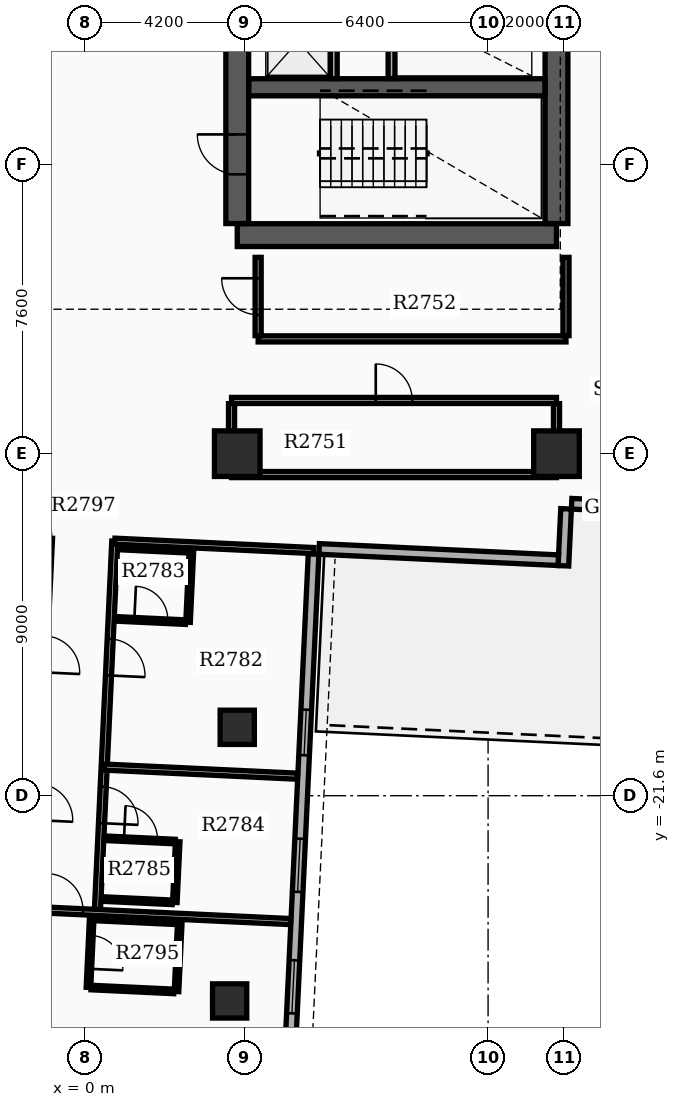
"""IFC4 building model, lengths in metres.
Left out: names, types, materials, properties, quantities, classifications, styles, units other than length and angle.
Written with IfcOpenShell. Run it as: python <this file> out.ifc"""

import sys

from ifc_helpers import new_model, si_unit, direction, frame, frame_2d, origin, origin_2d, place, context, subcontext, project, spatial, rectangle, extrude, element, fill, save


model = new_model("IFC4")
c1 = context("Model", 3, precision=1e-05, world=origin(), true_north=direction((0.0, 1.0)))
c2 = subcontext(c1, "Body", "Model", "MODEL_VIEW")
j1 = project(units=[si_unit("LENGTHUNIT", "METRE"), si_unit("PLANEANGLEUNIT", "RADIAN")], contexts=[c1])
p1 = place(None, origin())
s1 = spatial("IfcSite", under=j1, at=p1, CompositionType="ELEMENT")
p2 = place(p1, origin())
s2 = spatial("IfcBuilding", under=s1, at=p2, CompositionType="ELEMENT")
p3 = place(p2, frame((0.0, 0.0, 172.2)))
s3 = spatial("IfcBuildingStorey", under=s2, at=p3, CompositionType="ELEMENT", Elevation=172.2)
p4 = place(p3, frame((4.0, -6.85, 0.0), z_axis=(0.0, 0.0, 1.0), x_axis=(1.0, 0.0, 0.0)))
e1 = element("IfcWall", 1, at=p4, inside=s3, PredefinedType="SHEAR", context=c2, shape_type="SweptSolid", body=[
    extrude(rectangle(XDim=8.4, YDim=0.6, at=frame_2d((4.2, 0.0))), origin(), (0.0, 0.0, 1.0), 3.7),
])
p5 = place(p3, frame((4.0, -6.545, 0.0), z_axis=(0.0, 0.0, 1.0), x_axis=(0.0, 1.0, 0.0)))
e2 = element("IfcWall", 2, at=p5, inside=s3, PredefinedType="SHEAR", context=c2, shape_type="SweptSolid", body=[
    extrude(rectangle(XDim=11.19, YDim=0.6, at=frame_2d((5.595, 0.0))), origin(), (0.0, 0.0, 1.0), 3.7),
])
p6 = place(p5, frame((1.295, 0.0, 0.0)))
e3 = element("IfcOpeningElement", 3, at=p6, cuts=e2, PredefinedType="OPENING", context=c2, shape_type="SweptSolid", body=[
    extrude(rectangle(XDim=1.05, YDim=2.15, at=frame_2d((0.525, 1.075))), frame((0.0, 0.31, 0.0), z_axis=(0.0, -1.0, 0.0), x_axis=(1.0, 0.0, 0.0)), (0.0, 0.0, 1.0), 0.62),
])
p7 = place(p5, frame((6.895, 0.0, 0.0)))
e4 = element("IfcOpeningElement", 4, at=p7, cuts=e2, PredefinedType="OPENING", context=c2, shape_type="SweptSolid", body=[
    extrude(rectangle(XDim=1.05, YDim=2.15, at=frame_2d((0.525, 1.075))), frame((0.0, 0.31, 0.0), z_axis=(0.0, -1.0, 0.0), x_axis=(1.0, 0.0, 0.0)), (0.0, 0.0, 1.0), 0.62),
])
p8 = place(p3, frame((12.4, -6.545, 0.0), z_axis=(0.0, 0.0, 1.0), x_axis=(0.0, 1.0, 0.0)))
e5 = element("IfcWall", 5, at=p8, inside=s3, PredefinedType="SHEAR", context=c2, shape_type="SweptSolid", body=[
    extrude(rectangle(XDim=11.19, YDim=0.6, at=frame_2d((5.595, 0.0))), origin(), (0.0, 0.0, 1.0), 3.7),
])
p9 = place(p3, frame((4.305, -2.96, 0.0), z_axis=(0.0, 0.0, 1.0), x_axis=(1.0, 0.0, 0.0)))
e6 = element("IfcWall", 6, at=p9, inside=s3, PredefinedType="SHEAR", context=c2, shape_type="SweptSolid", body=[
    extrude(rectangle(XDim=7.79, YDim=0.45, at=frame_2d((3.895, 0.0))), origin(), (0.0, 0.0, 1.0), 3.7),
])
for number, where, z_axis, x_axis in (
    (7, (12.4, -12.6, 0.0), (0.0, 0.0, 1.0), (1.0, 0.0, 0.0)),
    (8, (4.0, -12.6, 0.0), (0.0, 0.0, 1.0), (1.0, 0.0, 0.0)),
):
    element("IfcColumn", number, at=place(p3, frame(where, z_axis=z_axis, x_axis=x_axis)), inside=s3, PredefinedType="COLUMN", context=c2, shape_type="SweptSolid", body=[
        extrude(rectangle(XDim=1.2, YDim=1.2, at=origin_2d()), origin(), (0.0, 0.0, 1.0), 3.9),
    ])
for number, where, z_axis, x_axis in (
    (9, (4.0, -19.8, 0.0), (0.0, 0.0, 1.0), (1.0, 0.0, 0.0)),
    (10, (3.8, -27.0, 0.0), (0.0, 0.0, 1.0), (1.0, 0.0, 0.0)),
):
    element("IfcColumn", number, at=place(p3, frame(where, z_axis=z_axis, x_axis=x_axis)), inside=s3, PredefinedType="COLUMN", context=c2, shape_type="SweptSolid", body=[
        extrude(rectangle(XDim=0.9, YDim=0.9, at=origin_2d()), origin(), (0.0, 0.0, 1.0), 3.9),
    ])
p10 = place(p3, frame((5.062, -35.318, 0.0), z_axis=(0.0, 0.0, 1.0), x_axis=(0.047103473814, 0.998890015344, 0.0)))
e11 = element("IfcWall", 11, at=p10, inside=s3, PredefinedType="STANDARD", context=c2, shape_type="SweptSolid", body=[
    extrude(rectangle(XDim=20.1, YDim=0.28, at=frame_2d((10.05, 0.0))), origin(), (0.0, 0.0, 1.0), 2.97),
])
p11 = place(p10, frame((1.6, 0.0, 0.8)))
e12 = element("IfcOpeningElement", 12, at=p11, cuts=e11, PredefinedType="OPENING", context=c2, shape_type="SweptSolid", body=[
    extrude(rectangle(XDim=1.4, YDim=1.6, at=frame_2d((0.7, 0.8))), frame((0.0, 0.15, 0.0), z_axis=(0.0, -1.0, 0.0), x_axis=(1.0, 0.0, 0.0)), (0.0, 0.0, 1.0), 0.3),
])
p12 = place(p10, frame((4.8, 0.0, 0.8)))
e13 = element("IfcOpeningElement", 13, at=p12, cuts=e11, PredefinedType="OPENING", context=c2, shape_type="SweptSolid", body=[
    extrude(rectangle(XDim=1.4, YDim=1.6, at=frame_2d((0.7, 0.8))), frame((0.0, 0.15, 0.0), z_axis=(0.0, -1.0, 0.0), x_axis=(1.0, 0.0, 0.0)), (0.0, 0.0, 1.0), 0.3),
])
p13 = place(p10, frame((8.0, 0.0, 0.8)))
e14 = element("IfcOpeningElement", 14, at=p13, cuts=e11, PredefinedType="OPENING", context=c2, shape_type="SweptSolid", body=[
    extrude(rectangle(XDim=1.4, YDim=1.6, at=frame_2d((0.7, 0.8))), frame((0.0, 0.15, 0.0), z_axis=(0.0, -1.0, 0.0), x_axis=(1.0, 0.0, 0.0)), (0.0, 0.0, 1.0), 0.3),
])
p14 = place(p10, frame((11.2, 0.0, 0.8)))
e15 = element("IfcOpeningElement", 15, at=p14, cuts=e11, PredefinedType="OPENING", context=c2, shape_type="SweptSolid", body=[
    extrude(rectangle(XDim=1.4, YDim=1.6, at=frame_2d((0.7, 0.8))), frame((0.0, 0.15, 0.0), z_axis=(0.0, -1.0, 0.0), x_axis=(1.0, 0.0, 0.0)), (0.0, 0.0, 1.0), 0.3),
])
p15 = place(p10, frame((14.799, 0.0, 0.85)))
e16 = element("IfcOpeningElement", 16, at=p15, cuts=e11, PredefinedType="OPENING", context=c2, shape_type="SweptSolid", body=[
    extrude(rectangle(XDim=1.2, YDim=1.6, at=frame_2d((0.6, 0.8))), frame((0.0, 0.15, 0.0), z_axis=(0.0, -1.0, 0.0), x_axis=(1.0, 0.0, 0.0)), (0.0, 0.0, 1.0), 0.3),
])
p16 = place(p3, frame((14.017, -13.976, 0.0), z_axis=(0.0, 0.0, 1.0), x_axis=(-0.998883930236, 0.047232339719, 0.0)))
e17 = element("IfcWall", 17, at=p16, inside=s3, PredefinedType="STANDARD", context=c2, shape_type="SweptSolid", body=[
    extrude(rectangle(XDim=1.22, YDim=0.28, at=frame_2d((0.61, 0.0))), origin(), (0.0, 0.0, 1.0), 2.97),
])
p17 = place(p3, frame((12.652, -14.052, 0.0), z_axis=(0.0, 0.0, 1.0), x_axis=(-0.047039284441, -0.99889304018, 0.0)))
e18 = element("IfcWall", 18, at=p17, inside=s3, PredefinedType="STANDARD", context=c2, shape_type="SweptSolid", body=[
    extrude(rectangle(XDim=1.5, YDim=0.28, at=frame_2d((0.75, 0.0))), origin(), (0.0, 0.0, 1.0), 2.97),
])
p18 = place(p3, frame((12.448, -15.404, 0.0), z_axis=(0.0, 0.0, 1.0), x_axis=(-0.998889082162, 0.047123258997, 0.0)))
e19 = element("IfcWall", 19, at=p18, inside=s3, PredefinedType="STANDARD", context=c2, shape_type="SweptSolid", body=[
    extrude(rectangle(XDim=6.3, YDim=0.28, at=frame_2d((3.15, 0.0))), origin(), (0.0, 0.0, 1.0), 2.97),
])
for number, where, z_axis, x_axis in (
    (20, (6.54, -2.73, 0.0), (0.0, 0.0, 1.0), (0.0, 1.0, 0.0)),
    (21, (8.06, -2.73, 0.0), (0.0, 0.0, 1.0), (0.0, 1.0, 0.0)),
):
    element("IfcWall", number, at=place(p3, frame(where, z_axis=z_axis, x_axis=x_axis)), inside=s3, PredefinedType="SOLIDWALL", context=c2, shape_type="SweptSolid", body=[
        extrude(rectangle(XDim=1.89, YDim=0.18, at=frame_2d((0.945, 0.0))), origin(), (0.0, 0.0, 1.0), 2.96),
    ])
p19 = place(p3, frame((3.85, -13.15, 0.0), z_axis=(0.0, 0.0, 1.0), x_axis=(1.0, 0.0, 0.0)))
e22 = element("IfcWall", 22, at=p19, inside=s3, PredefinedType="PARTITIONING", context=c2, shape_type="SweptSolid", body=[
    extrude(rectangle(XDim=8.55, YDim=0.16, at=frame_2d((4.275, 0.0))), origin(), (0.0, 0.0, 1.0), 2.96),
])
p20 = place(p3, frame((3.85, -11.2, 0.0), z_axis=(0.0, 0.0, 1.0), x_axis=(1.0, 0.0, 0.0)))
e23 = element("IfcWall", 23, at=p20, inside=s3, PredefinedType="PARTITIONING", context=c2, shape_type="SweptSolid", body=[
    extrude(rectangle(XDim=8.55, YDim=0.16, at=frame_2d((4.275, 0.0))), origin(), (0.0, 0.0, 1.0), 2.96),
])
p21 = place(p20, frame((3.795, 0.0, 0.0)))
e24 = element("IfcOpeningElement", 24, at=p21, cuts=e23, PredefinedType="OPENING", context=c2, shape_type="SweptSolid", body=[
    extrude(rectangle(XDim=0.96, YDim=2.15, at=frame_2d((0.48, 1.075))), frame((0.0, 0.09, 0.0), z_axis=(0.0, -1.0, 0.0), x_axis=(1.0, 0.0, 0.0)), (0.0, 0.0, 1.0), 0.18),
])
for number, where, z_axis, x_axis in (
    (25, (3.85, -13.065, 0.0), (0.0, 0.0, 1.0), (0.0, 1.0, 0.0)),
    (26, (12.4, -13.065, 0.0), (0.0, 0.0, 1.0), (0.0, 1.0, 0.0)),
):
    element("IfcWall", number, at=place(p3, frame(where, z_axis=z_axis, x_axis=x_axis)), inside=s3, PredefinedType="PARTITIONING", context=c2, shape_type="SweptSolid", body=[
        extrude(rectangle(XDim=1.78, YDim=0.16, at=frame_2d((0.89, 0.0))), origin(), (0.0, 0.0, 1.0), 2.96),
    ])
p22 = place(p3, frame((4.55, -9.58, 0.0), z_axis=(0.0, 0.0, 1.0), x_axis=(1.0, 0.0, 0.0)))
e27 = element("IfcWall", 27, at=p22, inside=s3, PredefinedType="PARTITIONING", context=c2, shape_type="SweptSolid", body=[
    extrude(rectangle(XDim=8.1, YDim=0.16, at=frame_2d((4.05, 0.0))), origin(), (0.0, 0.0, 1.0), 2.96),
])
p23 = place(p3, frame((4.55, -9.495, 0.0), z_axis=(0.0, 0.0, 1.0), x_axis=(0.0, 1.0, 0.0)))
e28 = element("IfcWall", 28, at=p23, inside=s3, PredefinedType="PARTITIONING", context=c2, shape_type="SweptSolid", body=[
    extrude(rectangle(XDim=2.06, YDim=0.16, at=frame_2d((1.03, 0.0))), origin(), (0.0, 0.0, 1.0), 2.96),
])
p24 = place(p23, frame((0.55, 0.0, 0.0)))
e29 = element("IfcOpeningElement", 29, at=p24, cuts=e28, PredefinedType="OPENING", context=c2, shape_type="SweptSolid", body=[
    extrude(rectangle(XDim=0.96, YDim=2.15, at=frame_2d((0.48, 1.075))), frame((0.0, 0.09, 0.0), z_axis=(0.0, -1.0, 0.0), x_axis=(1.0, 0.0, 0.0)), (0.0, 0.0, 1.0), 0.18),
])
p25 = place(p3, frame((12.65, -9.495, 0.0), z_axis=(0.0, 0.0, 1.0), x_axis=(0.0, 1.0, 0.0)))
e30 = element("IfcWall", 30, at=p25, inside=s3, PredefinedType="PARTITIONING", context=c2, shape_type="SweptSolid", body=[
    extrude(rectangle(XDim=2.06, YDim=0.16, at=frame_2d((1.03, 0.0))), origin(), (0.0, 0.0, 1.0), 2.96),
])
p26 = place(p3, frame((0.779, -14.903, 0.0), z_axis=(0.0, 0.0, 1.0), x_axis=(-0.047091598416, -0.998890575268, 0.0)))
e31 = element("IfcWall", 31, at=p26, inside=s3, PredefinedType="PARTITIONING", context=c2, shape_type="SweptSolid", body=[
    extrude(rectangle(XDim=9.7, YDim=0.16, at=frame_2d((4.85, 0.0))), origin(), (0.0, 0.0, 1.0), 2.96),
])
p27 = place(p26, frame((2.575, 0.0, 0.0)))
e32 = element("IfcOpeningElement", 32, at=p27, cuts=e31, PredefinedType="OPENING", context=c2, shape_type="SweptSolid", body=[
    extrude(rectangle(XDim=0.96, YDim=2.15, at=frame_2d((0.48, 1.075))), frame((0.0, 0.09, 0.0), z_axis=(0.0, -1.0, 0.0), x_axis=(1.0, 0.0, 0.0)), (0.0, 0.0, 1.0), 0.18),
])
p28 = place(p26, frame((6.467, 0.0, 0.0)))
e33 = element("IfcOpeningElement", 33, at=p28, cuts=e31, PredefinedType="OPENING", context=c2, shape_type="SweptSolid", body=[
    extrude(rectangle(XDim=0.96, YDim=2.15, at=frame_2d((0.48, 1.075))), frame((0.0, 0.09, 0.0), z_axis=(0.0, -1.0, 0.0), x_axis=(1.0, 0.0, 0.0)), (0.0, 0.0, 1.0), 0.18),
])
p29 = place(p3, frame((0.779, -14.903, 0.0), z_axis=(0.0, 0.0, 1.0), x_axis=(0.998889957338, -0.047104703898, 0.0)))
e34 = element("IfcWall", 34, at=p29, inside=s3, PredefinedType="PARTITIONING", context=c2, shape_type="SweptSolid", body=[
    extrude(rectangle(XDim=5.24, YDim=0.16, at=frame_2d((2.62, 0.0))), origin(), (0.0, 0.0, 1.0), 2.96),
])
p30 = place(p3, frame((0.499, -20.847, 0.0), z_axis=(0.0, 0.0, 1.0), x_axis=(0.998891017342, -0.047082220362, 0.0)))
e35 = element("IfcWall", 35, at=p30, inside=s3, PredefinedType="PARTITIONING", context=c2, shape_type="SweptSolid", body=[
    extrude(rectangle(XDim=5.092, YDim=0.16, at=frame_2d((2.546, 0.0))), origin(), (0.0, 0.0, 1.0), 2.96),
])
p31 = place(p3, frame((0.823, -16.948, 0.0), z_axis=(0.0, 0.0, 1.0), x_axis=(0.998891083954, -0.047080807099, 0.0)))
e36 = element("IfcWall", 36, at=p31, inside=s3, PredefinedType="PARTITIONING", context=c2, shape_type="SweptSolid", body=[
    extrude(rectangle(XDim=1.82, YDim=0.12, at=frame_2d((0.91, 0.0))), origin(), (0.0, 0.0, 1.0), 2.96),
])
p32 = place(p31, frame((0.47, 0.0, 0.0)))
e37 = element("IfcOpeningElement", 37, at=p32, cuts=e36, PredefinedType="OPENING", context=c2, shape_type="SweptSolid", body=[
    extrude(rectangle(XDim=0.88, YDim=2.1, at=frame_2d((0.44, 1.05))), frame((0.0, 0.07, 0.0), z_axis=(0.0, -1.0, 0.0), x_axis=(1.0, 0.0, 0.0)), (0.0, 0.0, 1.0), 0.14),
])
p33 = place(p3, frame((0.911, -15.07, 0.0), z_axis=(0.0, 0.0, 1.0), x_axis=(0.998884467853, -0.047220968666, 0.0)))
e38 = element("IfcWall", 38, at=p33, inside=s3, PredefinedType="PARTITIONING", context=c2, shape_type="SweptSolid", body=[
    extrude(rectangle(XDim=1.82, YDim=0.12, at=frame_2d((0.91, 0.0))), origin(), (0.0, 0.0, 1.0), 2.96),
])
p34 = place(p3, frame((2.794, -15.158, 0.0), z_axis=(0.0, 0.0, 1.0), x_axis=(-0.04700985207, -0.998894425757, 0.0)))
e39 = element("IfcWall", 39, at=p34, inside=s3, PredefinedType="PARTITIONING", context=c2, shape_type="SweptSolid", body=[
    extrude(rectangle(XDim=1.88, YDim=0.12, at=frame_2d((0.94, 0.0))), origin(), (0.0, 0.0, 1.0), 2.96),
])
p35 = place(p3, frame((0.55, -22.721, 0.0), z_axis=(0.0, 0.0, 1.0), x_axis=(0.998891083954, -0.047080807099, 0.0)))
e40 = element("IfcWall", 40, at=p35, inside=s3, PredefinedType="PARTITIONING", context=c2, shape_type="SweptSolid", body=[
    extrude(rectangle(XDim=1.82, YDim=0.12, at=frame_2d((0.91, 0.0))), origin(), (0.0, 0.0, 1.0), 2.96),
])
p36 = place(p35, frame((0.47, 0.0, 0.0)))
e41 = element("IfcOpeningElement", 41, at=p36, cuts=e40, PredefinedType="OPENING", context=c2, shape_type="SweptSolid", body=[
    extrude(rectangle(XDim=0.88, YDim=2.1, at=frame_2d((0.44, 1.05))), frame((0.0, 0.07, 0.0), z_axis=(0.0, -1.0, 0.0), x_axis=(1.0, 0.0, 0.0)), (0.0, 0.0, 1.0), 0.14),
])
p37 = place(p3, frame((0.475, -24.319, 0.0), z_axis=(0.0, 0.0, 1.0), x_axis=(0.998891083954, -0.047080807099, 0.0)))
e42 = element("IfcWall", 42, at=p37, inside=s3, PredefinedType="PARTITIONING", context=c2, shape_type="SweptSolid", body=[
    extrude(rectangle(XDim=1.82, YDim=0.12, at=frame_2d((0.91, 0.0))), origin(), (0.0, 0.0, 1.0), 2.96),
])
p38 = place(p3, frame((2.433, -22.81, 0.0), z_axis=(0.0, 0.0, 1.0), x_axis=(-0.046992475174, -0.998895243395, 0.0)))
e43 = element("IfcWall", 43, at=p38, inside=s3, PredefinedType="PARTITIONING", context=c2, shape_type="SweptSolid", body=[
    extrude(rectangle(XDim=1.6, YDim=0.12, at=frame_2d((0.8, 0.0))), origin(), (0.0, 0.0, 1.0), 2.96),
])
p39 = place(p3, frame((-7.725, -24.293, 0.0), z_axis=(0.0, 0.0, 1.0), x_axis=(0.998889967692, -0.047104484326, 0.0)))
e44 = element("IfcWall", 44, at=p39, inside=s3, PredefinedType="PARTITIONING", context=c2, shape_type="SweptSolid", body=[
    extrude(rectangle(XDim=13.144, YDim=0.16, at=frame_2d((6.572, 0.0))), origin(), (0.0, 0.0, 1.0), 2.96),
])
p40 = place(p39, frame((6.712, 0.0, 0.0)))
e45 = element("IfcOpeningElement", 45, at=p40, cuts=e44, PredefinedType="OPENING", context=c2, shape_type="SweptSolid", body=[
    extrude(rectangle(XDim=0.96, YDim=2.15, at=frame_2d((0.48, 1.075))), frame((0.0, 0.09, 0.0), z_axis=(0.0, -1.0, 0.0), x_axis=(1.0, 0.0, 0.0)), (0.0, 0.0, 1.0), 0.18),
])
p41 = place(p3, frame((0.171, -24.826, 0.0), z_axis=(0.0, 0.0, 1.0), x_axis=(-0.047087116047, -0.998890786574, 0.0)))
e46 = element("IfcWall", 46, at=p41, inside=s3, PredefinedType="PARTITIONING", context=c2, shape_type="SweptSolid", body=[
    extrude(rectangle(XDim=1.82, YDim=0.12, at=frame_2d((0.91, 0.0))), origin(), (0.0, 0.0, 1.0), 2.96),
])
p42 = place(p41, frame((0.45, 0.0, 0.0)))
e47 = element("IfcOpeningElement", 47, at=p42, cuts=e46, PredefinedType="OPENING", context=c2, shape_type="SweptSolid", body=[
    extrude(rectangle(XDim=0.88, YDim=2.1, at=frame_2d((0.44, 1.05))), frame((0.0, 0.07, 0.0), z_axis=(0.0, -1.0, 0.0), x_axis=(1.0, 0.0, 0.0)), (0.0, 0.0, 1.0), 0.14),
])
p43 = place(p3, frame((2.488, -24.935, 0.0), z_axis=(0.0, 0.0, 1.0), x_axis=(-0.047214641863, -0.998884766924, 0.0)))
e48 = element("IfcWall", 48, at=p43, inside=s3, PredefinedType="PARTITIONING", context=c2, shape_type="SweptSolid", body=[
    extrude(rectangle(XDim=1.82, YDim=0.12, at=frame_2d((0.91, 0.0))), origin(), (0.0, 0.0, 1.0), 2.96),
])
p44 = place(p3, frame((0.241, -24.829, 0.0), z_axis=(0.0, 0.0, 1.0), x_axis=(0.998887815408, -0.047150103183, 0.0)))
e49 = element("IfcWall", 49, at=p44, inside=s3, PredefinedType="PARTITIONING", context=c2, shape_type="SweptSolid", body=[
    extrude(rectangle(XDim=2.18, YDim=0.12, at=frame_2d((1.09, 0.0))), origin(), (0.0, 0.0, 1.0), 2.96),
])
p45 = place(p3, frame((0.155, -26.647, 0.0), z_axis=(0.0, 0.0, 1.0), x_axis=(0.998893331673, -0.047033094092, 0.0)))
e50 = element("IfcWall", 50, at=p45, inside=s3, PredefinedType="PARTITIONING", context=c2, shape_type="SweptSolid", body=[
    extrude(rectangle(XDim=2.18, YDim=0.12, at=frame_2d((1.09, 0.0))), origin(), (0.0, 0.0, 1.0), 2.96),
])
p46 = place(p13, origin())
e51 = element("IfcWindow", 51, at=p46, inside=s3, PartitioningType="SINGLE_PANEL", PredefinedType="WINDOW", context=c2, shape_type="SweptSolid", body=[
    extrude(rectangle(XDim=1.4, YDim=1.6, at=frame_2d((0.7, 0.8))), frame((0.0, 0.03, 0.0), z_axis=(0.0, -1.0, 0.0), x_axis=(1.0, 0.0, 0.0)), (0.0, 0.0, 1.0), 0.06),
])
fill(e14, e51)
p47 = place(p14, origin())
e52 = element("IfcWindow", 52, at=p47, inside=s3, PartitioningType="SINGLE_PANEL", PredefinedType="WINDOW", context=c2, shape_type="SweptSolid", body=[
    extrude(rectangle(XDim=1.4, YDim=1.6, at=frame_2d((0.7, 0.8))), frame((0.0, 0.03, 0.0), z_axis=(0.0, -1.0, 0.0), x_axis=(1.0, 0.0, 0.0)), (0.0, 0.0, 1.0), 0.06),
])
fill(e15, e52)
p48 = place(p15, origin())
e53 = element("IfcWindow", 53, at=p48, inside=s3, PartitioningType="SINGLE_PANEL", PredefinedType="WINDOW", context=c2, shape_type="SweptSolid", body=[
    extrude(rectangle(XDim=1.2, YDim=1.6, at=frame_2d((0.6, 0.8))), frame((0.0, 0.03, 0.0), z_axis=(0.0, -1.0, 0.0), x_axis=(1.0, 0.0, 0.0)), (0.0, 0.0, 1.0), 0.06),
])
fill(e16, e53)
p49 = place(p6, origin())
e54 = element("IfcDoor", 54, at=p49, inside=s3, OperationType="SINGLE_SWING_RIGHT", PredefinedType="DOOR", context=c2, shape_type="SweptSolid", body=[
    extrude(rectangle(XDim=1.05, YDim=2.15, at=frame_2d((0.525, 1.075))), frame((0.0, 0.025, 0.0), z_axis=(0.0, -1.0, 0.0), x_axis=(1.0, 0.0, 0.0)), (0.0, 0.0, 1.0), 0.05),
])
fill(e3, e54)
p50 = place(p21, origin())
e55 = element("IfcDoor", 55, at=p50, inside=s3, OperationType="SINGLE_SWING_LEFT", PredefinedType="DOOR", context=c2, shape_type="SweptSolid", body=[
    extrude(rectangle(XDim=0.96, YDim=2.15, at=frame_2d((0.48, 1.075))), frame((0.0, 0.025, 0.0), z_axis=(0.0, -1.0, 0.0), x_axis=(1.0, 0.0, 0.0)), (0.0, 0.0, 1.0), 0.05),
])
fill(e24, e55)
p51 = place(p24, origin())
e56 = element("IfcDoor", 56, at=p51, inside=s3, OperationType="SINGLE_SWING_RIGHT", PredefinedType="DOOR", context=c2, shape_type="SweptSolid", body=[
    extrude(rectangle(XDim=0.96, YDim=2.15, at=frame_2d((0.48, 1.075))), frame((0.0, 0.025, 0.0), z_axis=(0.0, -1.0, 0.0), x_axis=(1.0, 0.0, 0.0)), (0.0, 0.0, 1.0), 0.05),
])
fill(e29, e56)
p52 = place(p27, origin())
e57 = element("IfcDoor", 57, at=p52, inside=s3, OperationType="SINGLE_SWING_RIGHT", PredefinedType="DOOR", context=c2, shape_type="SweptSolid", body=[
    extrude(rectangle(XDim=0.96, YDim=2.15, at=frame_2d((0.48, 1.075))), frame((0.0, 0.025, 0.0), z_axis=(0.0, -1.0, 0.0), x_axis=(1.0, 0.0, 0.0)), (0.0, 0.0, 1.0), 0.05),
])
fill(e32, e57)
p53 = place(p32, origin())
e58 = element("IfcDoor", 58, at=p53, inside=s3, OperationType="SINGLE_SWING_LEFT", PredefinedType="DOOR", context=c2, shape_type="SweptSolid", body=[
    extrude(rectangle(XDim=0.88, YDim=2.1, at=frame_2d((0.44, 1.05))), frame((0.0, 0.025, 0.0), z_axis=(0.0, -1.0, 0.0), x_axis=(1.0, 0.0, 0.0)), (0.0, 0.0, 1.0), 0.05),
])
fill(e37, e58)
p54 = place(p28, origin())
e59 = element("IfcDoor", 59, at=p54, inside=s3, OperationType="SINGLE_SWING_RIGHT", PredefinedType="DOOR", context=c2, shape_type="SweptSolid", body=[
    extrude(rectangle(XDim=0.96, YDim=2.15, at=frame_2d((0.48, 1.075))), frame((0.0, 0.025, 0.0), z_axis=(0.0, -1.0, 0.0), x_axis=(1.0, 0.0, 0.0)), (0.0, 0.0, 1.0), 0.05),
])
fill(e33, e59)
p55 = place(p36, origin())
e60 = element("IfcDoor", 60, at=p55, inside=s3, OperationType="SINGLE_SWING_LEFT", PredefinedType="DOOR", context=c2, shape_type="SweptSolid", body=[
    extrude(rectangle(XDim=0.88, YDim=2.1, at=frame_2d((0.44, 1.05))), frame((0.0, 0.025, 0.0), z_axis=(0.0, -1.0, 0.0), x_axis=(1.0, 0.0, 0.0)), (0.0, 0.0, 1.0), 0.05),
])
fill(e41, e60)
p56 = place(p40, origin())
e61 = element("IfcDoor", 61, at=p56, inside=s3, OperationType="SINGLE_SWING_LEFT", PredefinedType="DOOR", context=c2, shape_type="SweptSolid", body=[
    extrude(rectangle(XDim=0.96, YDim=2.15, at=frame_2d((0.48, 1.075))), frame((0.0, 0.025, 0.0), z_axis=(0.0, -1.0, 0.0), x_axis=(1.0, 0.0, 0.0)), (0.0, 0.0, 1.0), 0.05),
])
fill(e45, e61)
p57 = place(p42, origin())
e62 = element("IfcDoor", 62, at=p57, inside=s3, OperationType="SINGLE_SWING_RIGHT", PredefinedType="DOOR", context=c2, shape_type="SweptSolid", body=[
    extrude(rectangle(XDim=0.88, YDim=2.1, at=frame_2d((0.44, 1.05))), frame((0.0, 0.025, 0.0), z_axis=(0.0, -1.0, 0.0), x_axis=(1.0, 0.0, 0.0)), (0.0, 0.0, 1.0), 0.05),
])
fill(e47, e62)
save(model, sys.argv[1])
